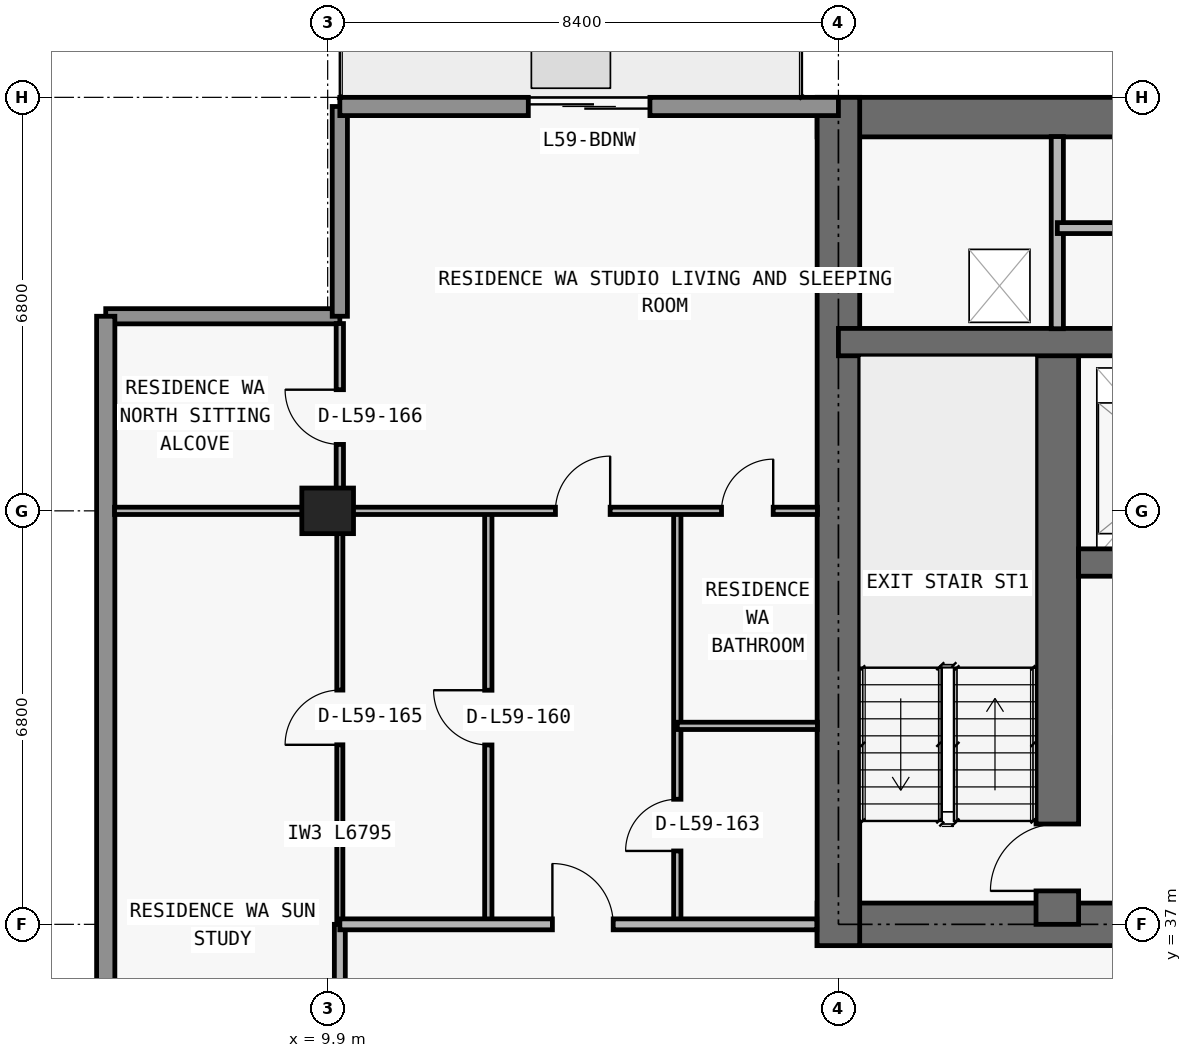
"""IFC4 building model, lengths in metres.
Left out: names, types, materials, properties, quantities, classifications, styles, units other than length and angle.
Written with IfcOpenShell. Run it as: python <this file> out.ifc"""

import sys

from ifc_helpers import new_model, si_unit, direction, frame, frame_2d, origin, origin_2d, place, context, subcontext, project, spatial, rectangle, extrude, element, fill, save


model = new_model("IFC4")
c1 = context("Model", 3, precision=1e-05, world=origin(), true_north=direction((0.0, 1.0)))
c2 = subcontext(c1, "Body", "Model", "MODEL_VIEW")
j1 = project(units=[si_unit("LENGTHUNIT", "METRE"), si_unit("PLANEANGLEUNIT", "RADIAN")], contexts=[c1])
p1 = place(None, origin())
s1 = spatial("IfcSite", under=j1, at=p1, CompositionType="ELEMENT")
p2 = place(p1, origin())
s2 = spatial("IfcBuilding", under=s1, at=p2, CompositionType="ELEMENT")
p3 = place(p2, frame((0.0, 0.0, 211.5)))
s3 = spatial("IfcBuildingStorey", under=s2, at=p3, CompositionType="ELEMENT", Elevation=211.5)
p4 = place(p3, frame((9.9, 43.8, 0.0), z_axis=(0.0, 0.0, 1.0), x_axis=(1.0, 0.0, 0.0)))
e1 = element("IfcColumn", 1, at=p4, inside=s3, PredefinedType="COLUMN", context=c2, shape_type="SweptSolid", body=[
    extrude(rectangle(XDim=0.85, YDim=0.75, at=origin_2d()), origin(), (0.0, 0.0, 1.0), 3.05),
])
p5 = place(p3, frame((17.95, 37.0, 0.0), z_axis=(0.0, 0.0, 1.0), x_axis=(1.0, 0.0, 0.0)))
e2 = element("IfcWall", 2, at=p5, inside=s3, PredefinedType="SHEAR", context=c2, shape_type="SweptSolid", body=[
    extrude(rectangle(XDim=41.9, YDim=0.7, at=frame_2d((20.95, 0.0))), origin(), (0.0, 0.0, 1.0), 3.05),
])
p6 = place(p5, frame((14.35, 0.0, 0.0)))
e3 = element("IfcOpeningElement", 3, at=p6, cuts=e2, PredefinedType="OPENING", context=c2, shape_type="SweptSolid", body=[
    extrude(rectangle(XDim=1.1, YDim=2.15, at=frame_2d((0.55, 1.075))), frame((0.0, 0.36, 0.0), z_axis=(0.0, -1.0, 0.0), x_axis=(1.0, 0.0, 0.0)), (0.0, 0.0, 1.0), 0.72),
])
p7 = place(p5, frame((6.2, 0.0, 0.0)))
e4 = element("IfcOpeningElement", 4, at=p7, cuts=e2, PredefinedType="OPENING", context=c2, shape_type="SweptSolid", body=[
    extrude(rectangle(XDim=1.05, YDim=2.15, at=frame_2d((0.525, 1.075))), frame((0.0, 0.36, 0.0), z_axis=(0.0, -1.0, 0.0), x_axis=(1.0, 0.0, 0.0)), (0.0, 0.0, 1.0), 0.72),
])
p8 = place(p5, frame((34.7, 0.0, 0.0)))
e5 = element("IfcOpeningElement", 5, at=p8, cuts=e2, PredefinedType="OPENING", context=c2, shape_type="SweptSolid", body=[
    extrude(rectangle(XDim=1.05, YDim=2.15, at=frame_2d((0.525, 1.075))), frame((0.0, 0.36, 0.0), z_axis=(0.0, -1.0, 0.0), x_axis=(1.0, 0.0, 0.0)), (0.0, 0.0, 1.0), 0.72),
])
p9 = place(p5, frame((10.812, 0.0, 0.0)))
e6 = element("IfcOpeningElement", 6, at=p9, cuts=e2, PredefinedType="OPENING", context=c2, shape_type="SweptSolid", body=[
    extrude(rectangle(XDim=1.05, YDim=2.15, at=frame_2d((0.525, 1.075))), frame((0.0, 0.36, 0.0), z_axis=(0.0, -1.0, 0.0), x_axis=(1.0, 0.0, 0.0)), (0.0, 0.0, 1.0), 0.72),
])
p10 = place(p5, frame((24.05, 0.0, 0.0)))
e7 = element("IfcOpeningElement", 7, at=p10, cuts=e2, PredefinedType="OPENING", context=c2, shape_type="SweptSolid", body=[
    extrude(rectangle(XDim=1.05, YDim=2.15, at=frame_2d((0.525, 1.075))), frame((0.0, 0.36, 0.0), z_axis=(0.0, -1.0, 0.0), x_axis=(1.0, 0.0, 0.0)), (0.0, 0.0, 1.0), 0.72),
])
p11 = place(p3, frame((17.95, 50.275, 0.0), z_axis=(0.0, 0.0, 1.0), x_axis=(1.0, 0.0, 0.0)))
e8 = element("IfcWall", 8, at=p11, inside=s3, PredefinedType="SHEAR", context=c2, shape_type="SweptSolid", body=[
    extrude(rectangle(XDim=41.9, YDim=0.65, at=frame_2d((20.95, 0.0))), origin(), (0.0, 0.0, 1.0), 3.05),
])
p12 = place(p3, frame((18.3, 36.65, 0.0), z_axis=(0.0, 0.0, 1.0), x_axis=(0.0, 1.0, 0.0)))
e9 = element("IfcWall", 9, at=p12, inside=s3, PredefinedType="SHEAR", context=c2, shape_type="SweptSolid", body=[
    extrude(rectangle(XDim=13.95, YDim=0.7, at=frame_2d((6.975, 0.0))), origin(), (0.0, 0.0, 1.0), 3.05),
])
p13 = place(p3, frame((21.9, 37.0, 0.0), z_axis=(0.0, 0.0, 1.0), x_axis=(0.0, 1.0, 0.0)))
e10 = element("IfcWall", 10, at=p13, inside=s3, PredefinedType="SHEAR", context=c2, shape_type="SweptSolid", body=[
    extrude(rectangle(XDim=9.575, YDim=0.7, at=frame_2d((4.788, 0.0))), origin(), (0.0, 0.0, 1.0), 3.05),
])
p14 = place(p13, frame((0.55, 0.0, 0.0)))
e11 = element("IfcOpeningElement", 11, at=p14, cuts=e10, PredefinedType="OPENING", context=c2, shape_type="SweptSolid", body=[
    extrude(rectangle(XDim=1.1, YDim=2.15, at=frame_2d((0.55, 1.075))), frame((0.0, 0.36, 0.0), z_axis=(0.0, -1.0, 0.0), x_axis=(1.0, 0.0, 0.0)), (0.0, 0.0, 1.0), 0.72),
])
p15 = place(p3, frame((22.25, 42.95, 0.0), z_axis=(0.0, 0.0, 1.0), x_axis=(1.0, 0.0, 0.0)))
e12 = element("IfcWall", 12, at=p15, inside=s3, PredefinedType="SHEAR", context=c2, shape_type="SweptSolid", body=[
    extrude(rectangle(XDim=33.3, YDim=0.45, at=frame_2d((16.65, 0.0))), origin(), (0.0, 0.0, 1.0), 3.05),
])
p16 = place(p15, frame((1.05, 0.0, 0.0)))
e13 = element("IfcOpeningElement", 13, at=p16, cuts=e12, PredefinedType="OPENING", context=c2, shape_type="SweptSolid", body=[
    extrude(rectangle(XDim=1.2, YDim=2.2, at=frame_2d((0.6, 1.1))), frame((0.0, 0.235, 0.0), z_axis=(0.0, -1.0, 0.0), x_axis=(1.0, 0.0, 0.0)), (0.0, 0.0, 1.0), 0.47),
])
p17 = place(p15, frame((31.05, 0.0, 0.0)))
e14 = element("IfcOpeningElement", 14, at=p17, cuts=e12, PredefinedType="OPENING", context=c2, shape_type="SweptSolid", body=[
    extrude(rectangle(XDim=1.2, YDim=2.2, at=frame_2d((0.6, 1.1))), frame((0.0, 0.235, 0.0), z_axis=(0.0, -1.0, 0.0), x_axis=(1.0, 0.0, 0.0)), (0.0, 0.0, 1.0), 0.47),
])
p18 = place(p15, frame((26.45, 0.0, 0.0)))
e15 = element("IfcOpeningElement", 15, at=p18, cuts=e12, PredefinedType="OPENING", context=c2, shape_type="SweptSolid", body=[
    extrude(rectangle(XDim=1.1, YDim=2.2, at=frame_2d((0.55, 1.1))), frame((0.0, 0.235, 0.0), z_axis=(0.0, -1.0, 0.0), x_axis=(1.0, 0.0, 0.0)), (0.0, 0.0, 1.0), 0.47),
])
p19 = place(p15, frame((5.95, 0.0, 0.0)))
e16 = element("IfcOpeningElement", 16, at=p19, cuts=e12, PredefinedType="OPENING", context=c2, shape_type="SweptSolid", body=[
    extrude(rectangle(XDim=1.1, YDim=2.2, at=frame_2d((0.55, 1.1))), frame((0.0, 0.235, 0.0), z_axis=(0.0, -1.0, 0.0), x_axis=(1.0, 0.0, 0.0)), (0.0, 0.0, 1.0), 0.47),
])
p20 = place(p15, frame((3.625, 0.0, 0.0)))
e17 = element("IfcOpeningElement", 17, at=p20, cuts=e12, PredefinedType="OPENING", context=c2, shape_type="SweptSolid", body=[
    extrude(rectangle(XDim=1.05, YDim=2.15, at=frame_2d((0.525, 1.075))), frame((0.0, 0.235, 0.0), z_axis=(0.0, -1.0, 0.0), x_axis=(1.0, 0.0, 0.0)), (0.0, 0.0, 1.0), 0.47),
])
p21 = place(p15, frame((28.675, 0.0, 0.0)))
e18 = element("IfcOpeningElement", 18, at=p21, cuts=e12, PredefinedType="OPENING", context=c2, shape_type="SweptSolid", body=[
    extrude(rectangle(XDim=1.05, YDim=2.15, at=frame_2d((0.525, 1.075))), frame((0.0, 0.235, 0.0), z_axis=(0.0, -1.0, 0.0), x_axis=(1.0, 0.0, 0.0)), (0.0, 0.0, 1.0), 0.47),
])
p22 = place(p15, frame((15.225, 0.0, 0.0)))
e19 = element("IfcOpeningElement", 19, at=p22, cuts=e12, PredefinedType="OPENING", context=c2, shape_type="SweptSolid", body=[
    extrude(rectangle(XDim=1.0, YDim=2.2, at=frame_2d((0.5, 1.1))), frame((0.0, 0.235, 0.0), z_axis=(0.0, -1.0, 0.0), x_axis=(1.0, 0.0, 0.0)), (0.0, 0.0, 1.0), 0.47),
])
p23 = place(p15, frame((21.975, 0.0, 0.0)))
e20 = element("IfcOpeningElement", 20, at=p23, cuts=e12, PredefinedType="OPENING", context=c2, shape_type="SweptSolid", body=[
    extrude(rectangle(XDim=1.0, YDim=2.2, at=frame_2d((0.5, 1.1))), frame((0.0, 0.235, 0.0), z_axis=(0.0, -1.0, 0.0), x_axis=(1.0, 0.0, 0.0)), (0.0, 0.0, 1.0), 0.47),
])
p24 = place(p3, frame((18.3, 46.575, 0.0), z_axis=(0.0, 0.0, 1.0), x_axis=(1.0, 0.0, 0.0)))
e21 = element("IfcWall", 21, at=p24, inside=s3, PredefinedType="SHEAR", context=c2, shape_type="SweptSolid", body=[
    extrude(rectangle(XDim=41.2, YDim=0.45, at=frame_2d((20.6, 0.0))), origin(), (0.0, 0.0, 1.0), 3.05),
])
p25 = place(p24, frame((7.575, 0.0, 0.0)))
e22 = element("IfcOpeningElement", 22, at=p25, cuts=e21, PredefinedType="OPENING", context=c2, shape_type="SweptSolid", body=[
    extrude(rectangle(XDim=1.05, YDim=2.15, at=frame_2d((0.525, 1.075))), frame((0.0, 0.235, 0.0), z_axis=(0.0, -1.0, 0.0), x_axis=(1.0, 0.0, 0.0)), (0.0, 0.0, 1.0), 0.47),
])
p26 = place(p24, frame((32.625, 0.0, 0.0)))
e23 = element("IfcOpeningElement", 23, at=p26, cuts=e21, PredefinedType="OPENING", context=c2, shape_type="SweptSolid", body=[
    extrude(rectangle(XDim=1.05, YDim=2.15, at=frame_2d((0.525, 1.075))), frame((0.0, 0.235, 0.0), z_axis=(0.0, -1.0, 0.0), x_axis=(1.0, 0.0, 0.0)), (0.0, 0.0, 1.0), 0.47),
])
p27 = place(p3, frame((6.25, 47.0, 0.0), z_axis=(0.0, 0.0, 1.0), x_axis=(1.0, 0.0, 0.0)))
e24 = element("IfcWall", 24, at=p27, inside=s3, PredefinedType="ELEMENTEDWALL", context=c2, shape_type="SweptSolid", body=[
    extrude(rectangle(XDim=3.85, YDim=0.25, at=frame_2d((1.925, 0.0))), origin(), (0.0, 0.0, 1.0), 3.05),
])
p28 = place(p3, frame((10.1, 47.0, 0.0), z_axis=(0.0, 0.0, 1.0), x_axis=(0.0, 1.0, 0.0)))
e25 = element("IfcWall", 25, at=p28, inside=s3, PredefinedType="ELEMENTEDWALL", context=c2, shape_type="SweptSolid", body=[
    extrude(rectangle(XDim=3.45, YDim=0.25, at=frame_2d((1.725, 0.0))), origin(), (0.0, 0.0, 1.0), 3.05),
])
p29 = place(p3, frame((6.25, 29.1, 0.0), z_axis=(0.0, 0.0, 1.0), x_axis=(0.0, 1.0, 0.0)))
e26 = element("IfcWall", 26, at=p29, inside=s3, PredefinedType="STANDARD", context=c2, shape_type="SweptSolid", body=[
    extrude(rectangle(XDim=17.9, YDim=0.3, at=frame_2d((8.95, 0.0))), origin(), (0.0, 0.0, 1.0), 3.05),
])
p30 = place(p3, frame((10.1, 50.45, 0.0), z_axis=(0.0, 0.0, 1.0), x_axis=(1.0, 0.0, 0.0)))
e27 = element("IfcWall", 27, at=p30, inside=s3, PredefinedType="STANDARD", context=c2, shape_type="SweptSolid", body=[
    extrude(rectangle(XDim=8.2, YDim=0.3, at=frame_2d((4.1, 0.0))), origin(), (0.0, 0.0, 1.0), 3.05),
])
p31 = place(p30, frame((3.1, 0.0, 0.0)))
e28 = element("IfcOpeningElement", 28, at=p31, cuts=e27, PredefinedType="OPENING", context=c2, shape_type="SweptSolid", body=[
    extrude(rectangle(XDim=2.0, YDim=2.3, at=frame_2d((1.0, 1.15))), frame((0.0, 0.16, 0.0), z_axis=(0.0, -1.0, 0.0), x_axis=(1.0, 0.0, 0.0)), (0.0, 0.0, 1.0), 0.32),
])
p32 = place(p3, frame((10.1, 34.005, 0.0), z_axis=(0.0, 0.0, 1.0), x_axis=(0.0, 1.0, 0.0)))
e29 = element("IfcWall", 29, at=p32, inside=s3, PredefinedType="PARTITIONING", context=c2, shape_type="SweptSolid", body=[
    extrude(rectangle(XDim=2.995, YDim=0.18, at=frame_2d((1.498, 0.0))), origin(), (0.0, 0.0, 1.0), 2.263),
])
p33 = place(p3, frame((10.1, 37.005, 0.0), z_axis=(0.0, 0.0, 1.0), x_axis=(0.0, 1.0, 0.0)))
e30 = element("IfcWall", 30, at=p33, inside=s3, PredefinedType="MOVABLE", context=c2, shape_type="SweptSolid", body=[
    extrude(rectangle(XDim=6.795, YDim=0.1, at=frame_2d((3.397, 0.0))), origin(), (0.0, 0.0, 1.0), 2.263),
])
p34 = place(p33, frame((2.948, 0.0, 0.0)))
e31 = element("IfcOpeningElement", 31, at=p34, cuts=e30, PredefinedType="OPENING", context=c2, shape_type="SweptSolid", body=[
    extrude(rectangle(XDim=0.9, YDim=2.15, at=frame_2d((0.45, 1.075))), frame((0.0, 0.06, 0.0), z_axis=(0.0, -1.0, 0.0), x_axis=(1.0, 0.0, 0.0)), (0.0, 0.0, 1.0), 0.12),
])
p35 = place(p3, frame((10.1, 43.805, 0.0), z_axis=(0.0, 0.0, 1.0), x_axis=(0.0, 1.0, 0.0)))
e32 = element("IfcWall", 32, at=p35, inside=s3, PredefinedType="PARTITIONING", context=c2, shape_type="SweptSolid", body=[
    extrude(rectangle(XDim=3.075, YDim=0.12, at=frame_2d((1.538, 0.0))), origin(), (0.0, 0.0, 1.0), 3.05),
])
p36 = place(p35, frame((1.087, 0.0, 0.0)))
e33 = element("IfcOpeningElement", 33, at=p36, cuts=e32, PredefinedType="OPENING", context=c2, shape_type="SweptSolid", body=[
    extrude(rectangle(XDim=0.9, YDim=2.15, at=frame_2d((0.45, 1.075))), frame((0.0, 0.07, 0.0), z_axis=(0.0, -1.0, 0.0), x_axis=(1.0, 0.0, 0.0)), (0.0, 0.0, 1.0), 0.14),
])
p37 = place(p3, frame((12.542, 37.0, 0.0), z_axis=(0.0, 0.0, 1.0), x_axis=(0.0, 1.0, 0.0)))
e34 = element("IfcWall", 34, at=p37, inside=s3, PredefinedType="PARTITIONING", context=c2, shape_type="SweptSolid", body=[
    extrude(rectangle(XDim=6.8, YDim=0.12, at=frame_2d((3.4, 0.0))), origin(), (0.0, 0.0, 1.0), 3.05),
])
p38 = place(p37, frame((2.95, 0.0, 0.0)))
e35 = element("IfcOpeningElement", 35, at=p38, cuts=e34, PredefinedType="OPENING", context=c2, shape_type="SweptSolid", body=[
    extrude(rectangle(XDim=0.9, YDim=2.15, at=frame_2d((0.45, 1.075))), frame((0.0, 0.07, 0.0), z_axis=(0.0, -1.0, 0.0), x_axis=(1.0, 0.0, 0.0)), (0.0, 0.0, 1.0), 0.14),
])
p39 = place(p3, frame((15.65, 37.0, 0.0), z_axis=(0.0, 0.0, 1.0), x_axis=(0.0, 1.0, 0.0)))
e36 = element("IfcWall", 36, at=p39, inside=s3, PredefinedType="PARTITIONING", context=c2, shape_type="SweptSolid", body=[
    extrude(rectangle(XDim=6.8, YDim=0.12, at=frame_2d((3.4, 0.0))), origin(), (0.0, 0.0, 1.0), 3.05),
])
p40 = place(p39, frame((1.207, 0.0, 0.0)))
e37 = element("IfcOpeningElement", 37, at=p40, cuts=e36, PredefinedType="OPENING", context=c2, shape_type="SweptSolid", body=[
    extrude(rectangle(XDim=0.85, YDim=2.1, at=frame_2d((0.425, 1.05))), frame((0.0, 0.07, 0.0), z_axis=(0.0, -1.0, 0.0), x_axis=(1.0, 0.0, 0.0)), (0.0, 0.0, 1.0), 0.14),
])
p41 = place(p3, frame((21.9, 46.795, 0.0), z_axis=(0.0, 0.0, 1.0), x_axis=(0.0, 1.0, 0.0)))
e38 = element("IfcWall", 38, at=p41, inside=s3, PredefinedType="PARTITIONING", context=c2, shape_type="SweptSolid", body=[
    extrude(rectangle(XDim=3.16, YDim=0.2, at=frame_2d((1.58, 0.0))), origin(), (0.0, 0.0, 1.0), 3.05),
])
p42 = place(p3, frame((10.1, 37.0, 0.0), z_axis=(0.0, 0.0, 1.0), x_axis=(1.0, 0.0, 0.0)))
e39 = element("IfcWall", 39, at=p42, inside=s3, PredefinedType="PARTITIONING", context=c2, shape_type="SweptSolid", body=[
    extrude(rectangle(XDim=7.845, YDim=0.18, at=frame_2d((3.922, 0.0))), origin(), (0.0, 0.0, 1.0), 3.05),
])
p43 = place(p42, frame((3.496, 0.0, 0.0)))
e40 = element("IfcOpeningElement", 40, at=p43, cuts=e39, PredefinedType="OPENING", context=c2, shape_type="SweptSolid", body=[
    extrude(rectangle(XDim=1.0, YDim=2.2, at=frame_2d((0.5, 1.1))), frame((0.0, 0.1, 0.0), z_axis=(0.0, -1.0, 0.0), x_axis=(1.0, 0.0, 0.0)), (0.0, 0.0, 1.0), 0.2),
])
p44 = place(p3, frame((15.65, 40.264, 0.0), z_axis=(0.0, 0.0, 1.0), x_axis=(1.0, 0.0, 0.0)))
e41 = element("IfcWall", 41, at=p44, inside=s3, PredefinedType="PARTITIONING", context=c2, shape_type="SweptSolid", body=[
    extrude(rectangle(XDim=2.305, YDim=0.12, at=frame_2d((1.153, 0.0))), origin(), (0.0, 0.0, 1.0), 3.05),
])
p45 = place(p3, frame((6.395, 43.8, 0.0), z_axis=(0.0, 0.0, 1.0), x_axis=(1.0, 0.0, 0.0)))
e42 = element("IfcWall", 42, at=p45, inside=s3, PredefinedType="PARTITIONING", context=c2, shape_type="SweptSolid", body=[
    extrude(rectangle(XDim=11.56, YDim=0.12, at=frame_2d((5.78, 0.0))), origin(), (0.0, 0.0, 1.0), 2.418),
])
p46 = place(p45, frame((7.251, 0.0, 0.0)))
e43 = element("IfcOpeningElement", 43, at=p46, cuts=e42, PredefinedType="OPENING", context=c2, shape_type="SweptSolid", body=[
    extrude(rectangle(XDim=0.9, YDim=2.15, at=frame_2d((0.45, 1.075))), frame((0.0, 0.07, 0.0), z_axis=(0.0, -1.0, 0.0), x_axis=(1.0, 0.0, 0.0)), (0.0, 0.0, 1.0), 0.14),
])
p47 = place(p45, frame((9.982, 0.0, 0.0)))
e44 = element("IfcOpeningElement", 44, at=p47, cuts=e42, PredefinedType="OPENING", context=c2, shape_type="SweptSolid", body=[
    extrude(rectangle(XDim=0.85, YDim=2.1, at=frame_2d((0.425, 1.05))), frame((0.0, 0.07, 0.0), z_axis=(0.0, -1.0, 0.0), x_axis=(1.0, 0.0, 0.0)), (0.0, 0.0, 1.0), 0.14),
])
p48 = place(p3, frame((21.9, 48.45, 0.0), z_axis=(0.0, 0.0, 1.0), x_axis=(1.0, 0.0, 0.0)))
e45 = element("IfcWall", 45, at=p48, inside=s3, PredefinedType="PARTITIONING", context=c2, shape_type="SweptSolid", body=[
    extrude(rectangle(XDim=4.75, YDim=0.18, at=frame_2d((2.375, 0.0))), origin(), (0.0, 0.0, 1.0), 3.05),
])
p49 = place(p48, frame((1.775, 0.0, 0.0)))
e46 = element("IfcOpeningElement", 46, at=p49, cuts=e45, PredefinedType="OPENING", context=c2, shape_type="SweptSolid", body=[
    extrude(rectangle(XDim=1.2, YDim=2.2, at=frame_2d((0.6, 1.1))), frame((0.0, 0.1, 0.0), z_axis=(0.0, -1.0, 0.0), x_axis=(1.0, 0.0, 0.0)), (0.0, 0.0, 1.0), 0.2),
])
p50 = place(p31, origin())
e47 = element("IfcDoor", 47, at=p50, inside=s3, OperationType="DOUBLE_DOOR_SLIDING", PredefinedType="DOOR", context=c2, shape_type="SweptSolid", body=[
    extrude(rectangle(XDim=2.0, YDim=2.3, at=frame_2d((1.0, 1.15))), frame((0.0, 0.025, 0.0), z_axis=(0.0, -1.0, 0.0), x_axis=(1.0, 0.0, 0.0)), (0.0, 0.0, 1.0), 0.05),
])
fill(e28, e47)
p51 = place(p14, origin())
e48 = element("IfcDoor", 48, at=p51, inside=s3, OperationType="SINGLE_SWING_LEFT", PredefinedType="DOOR", context=c2, shape_type="SweptSolid", body=[
    extrude(rectangle(XDim=1.1, YDim=2.15, at=frame_2d((0.55, 1.075))), frame((0.0, 0.025, 0.0), z_axis=(0.0, -1.0, 0.0), x_axis=(1.0, 0.0, 0.0)), (0.0, 0.0, 1.0), 0.05),
])
fill(e11, e48)
p52 = place(p38, origin())
e49 = element("IfcDoor", 49, at=p52, inside=s3, OperationType="SINGLE_SWING_RIGHT", PredefinedType="DOOR", context=c2, shape_type="SweptSolid", body=[
    extrude(rectangle(XDim=0.9, YDim=2.15, at=frame_2d((0.45, 1.075))), frame((0.0, 0.025, 0.0), z_axis=(0.0, -1.0, 0.0), x_axis=(1.0, 0.0, 0.0)), (0.0, 0.0, 1.0), 0.05),
])
fill(e35, e49)
p53 = place(p43, origin())
e50 = element("IfcDoor", 50, at=p53, inside=s3, OperationType="SINGLE_SWING_LEFT", PredefinedType="DOOR", context=c2, shape_type="SweptSolid", body=[
    extrude(rectangle(XDim=1.0, YDim=2.2, at=frame_2d((0.5, 1.1))), frame((0.0, 0.025, 0.0), z_axis=(0.0, -1.0, 0.0), x_axis=(1.0, 0.0, 0.0)), (0.0, 0.0, 1.0), 0.05),
])
fill(e40, e50)
p54 = place(p46, origin())
e51 = element("IfcDoor", 51, at=p54, inside=s3, OperationType="SINGLE_SWING_RIGHT", PredefinedType="DOOR", context=c2, shape_type="SweptSolid", body=[
    extrude(rectangle(XDim=0.9, YDim=2.15, at=frame_2d((0.45, 1.075))), frame((0.0, 0.025, 0.0), z_axis=(0.0, -1.0, 0.0), x_axis=(1.0, 0.0, 0.0)), (0.0, 0.0, 1.0), 0.05),
])
fill(e43, e51)
p55 = place(p40, origin())
e52 = element("IfcDoor", 52, at=p55, inside=s3, OperationType="SINGLE_SWING_LEFT", PredefinedType="DOOR", context=c2, shape_type="SweptSolid", body=[
    extrude(rectangle(XDim=0.85, YDim=2.1, at=frame_2d((0.425, 1.05))), frame((0.0, 0.025, 0.0), z_axis=(0.0, -1.0, 0.0), x_axis=(1.0, 0.0, 0.0)), (0.0, 0.0, 1.0), 0.05),
])
fill(e37, e52)
p56 = place(p47, origin())
e53 = element("IfcDoor", 53, at=p56, inside=s3, OperationType="SINGLE_SWING_RIGHT", PredefinedType="DOOR", context=c2, shape_type="SweptSolid", body=[
    extrude(rectangle(XDim=0.85, YDim=2.1, at=frame_2d((0.425, 1.05))), frame((0.0, 0.025, 0.0), z_axis=(0.0, -1.0, 0.0), x_axis=(1.0, 0.0, 0.0)), (0.0, 0.0, 1.0), 0.05),
])
fill(e44, e53)
p57 = place(p34, origin())
e54 = element("IfcDoor", 54, at=p57, inside=s3, OperationType="SINGLE_SWING_LEFT", PredefinedType="DOOR", context=c2, shape_type="SweptSolid", body=[
    extrude(rectangle(XDim=0.9, YDim=2.15, at=frame_2d((0.45, 1.075))), frame((0.0, 0.025, 0.0), z_axis=(0.0, -1.0, 0.0), x_axis=(1.0, 0.0, 0.0)), (0.0, 0.0, 1.0), 0.05),
])
fill(e31, e54)
p58 = place(p36, origin())
e55 = element("IfcDoor", 55, at=p58, inside=s3, OperationType="SINGLE_SWING_RIGHT", PredefinedType="DOOR", context=c2, shape_type="SweptSolid", body=[
    extrude(rectangle(XDim=0.9, YDim=2.15, at=frame_2d((0.45, 1.075))), frame((0.0, 0.025, 0.0), z_axis=(0.0, -1.0, 0.0), x_axis=(1.0, 0.0, 0.0)), (0.0, 0.0, 1.0), 0.05),
])
fill(e33, e55)
save(model, sys.argv[1])
